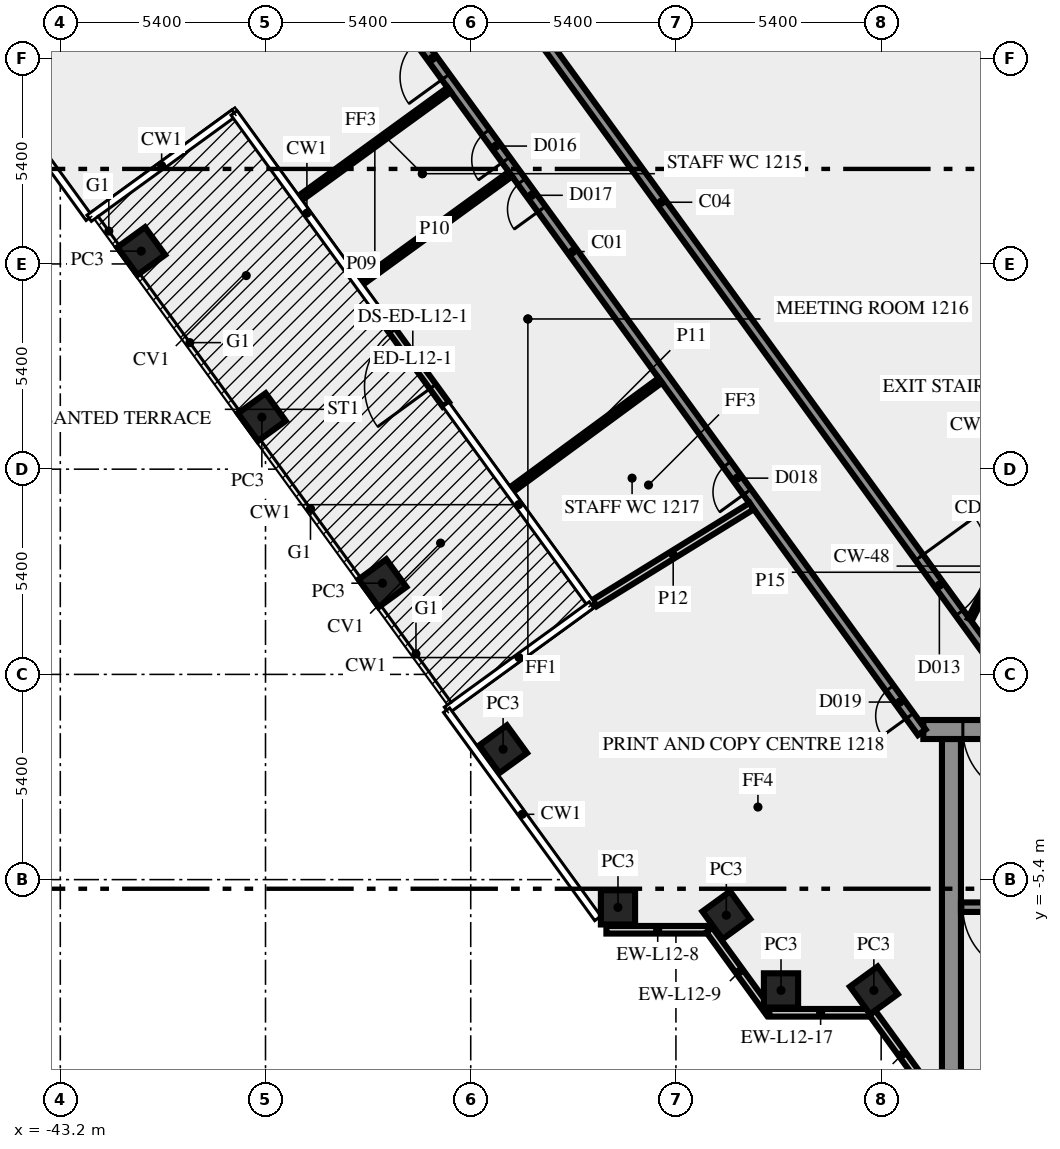
"""IFC4 building model, lengths in metres.
Left out: names, types, materials, properties, quantities, classifications, styles, units other than length and angle.
Written with IfcOpenShell. Run it as: python <this file> out.ifc"""

import sys

from ifc_helpers import new_model, si_unit, direction, frame, frame_2d, origin, origin_2d, place, context, subcontext, project, spatial, rectangle, extrude, element, fill, save


model = new_model("IFC4")
c1 = context("Model", 3, precision=1e-05, world=origin(), true_north=direction((0.0, 1.0)))
c2 = subcontext(c1, "Body", "Model", "MODEL_VIEW")
j1 = project(units=[si_unit("LENGTHUNIT", "METRE"), si_unit("PLANEANGLEUNIT", "RADIAN")], contexts=[c1])
p1 = place(None, origin())
s1 = spatial("IfcSite", under=j1, at=p1, CompositionType="ELEMENT")
p2 = place(p1, origin())
s2 = spatial("IfcBuilding", under=s1, at=p2, CompositionType="ELEMENT")
p3 = place(p2, frame((0.0, 0.0, 55.0)))
s3 = spatial("IfcBuildingStorey", under=s2, at=p3, CompositionType="ELEMENT", Elevation=55.0)
for number, where, z_axis, x_axis in (
    (1, (-41.07, 11.137, 0.0), (0.0, 0.0, 1.0), (0.588, -0.809, 0.0)),
    (2, (-37.896, 6.769, 0.0), (0.0, 0.0, 1.0), (0.588, -0.809, 0.0)),
    (3, (-34.722, 2.4, 0.0), (0.0, 0.0, 1.0), (0.588, -0.809, 0.0)),
    (4, (-31.548, -1.969, 0.0), (0.0, 0.0, 1.0), (0.588, -0.809, 0.0)),
    (5, (-28.525, -6.13, 0.0), (0.0, 0.0, 1.0), (1.0, 0.0, 0.0)),
    (6, (-25.674, -6.337, 0.0), (0.0, 0.0, 1.0), (0.588, -0.809, 0.0)),
    (7, (-24.235, -8.315, 0.0), (0.0, 0.0, 1.0), (1.0, 0.0, 0.0)),
    (8, (-21.792, -8.315, 0.0), (0.0, 0.0, 1.0), (0.588, -0.809, 0.0)),
):
    element("IfcColumn", number, at=place(p3, frame(where, z_axis=z_axis, x_axis=x_axis)), inside=s3, PredefinedType="COLUMN", context=c2, shape_type="SweptSolid", body=[
        extrude(rectangle(XDim=0.9, YDim=0.9, at=origin_2d()), origin(), (0.0, 0.0, 1.0), 3.65),
    ])
p4 = place(p3, frame((-33.053, 7.103, 0.0), z_axis=(0.0, 0.0, 1.0), x_axis=(-0.587774760134, 0.809024617271, 0.0)))
e9 = element("IfcWall", 9, at=p4, inside=s3, PredefinedType="SOLIDWALL", context=c2, shape_type="SweptSolid", body=[
    extrude(rectangle(XDim=2.963, YDim=0.2, at=frame_2d((1.481, 0.0))), origin(), (0.0, 0.0, 1.0), 3.65),
])
p5 = place(p4, frame((0.582, 0.0, 0.0)))
e10 = element("IfcOpeningElement", 10, at=p5, cuts=e9, PredefinedType="OPENING", context=c2, shape_type="SweptSolid", body=[
    extrude(rectangle(XDim=1.8, YDim=2.4, at=frame_2d((0.9, 1.2))), frame((0.0, 0.11, 0.0), z_axis=(0.0, -1.0, 0.0), x_axis=(1.0, 0.0, 0.0)), (0.0, 0.0, 1.0), 0.22),
])
p6 = place(p3, frame((-28.83, -6.719, 0.0), z_axis=(0.0, 0.0, 1.0), x_axis=(1.0, 0.0, 0.0)))
e11 = element("IfcWall", 11, at=p6, inside=s3, PredefinedType="SOLIDWALL", context=c2, shape_type="SweptSolid", body=[
    extrude(rectangle(XDim=2.7, YDim=0.2, at=frame_2d((1.35, 0.0))), origin(), (0.0, 0.0, 1.0), 3.65),
])
p7 = place(p3, frame((-26.12, -6.724, 0.0), z_axis=(0.0, 0.0, 1.0), x_axis=(0.587720002413, -0.809064397168, 0.0)))
e12 = element("IfcWall", 12, at=p7, inside=s3, PredefinedType="SOLIDWALL", context=c2, shape_type="SweptSolid", body=[
    extrude(rectangle(XDim=2.7, YDim=0.2, at=frame_2d((1.35, 0.0))), origin(), (0.0, 0.0, 1.0), 3.65),
])
p8 = place(p3, frame((-24.543, -8.904, 0.0), z_axis=(0.0, 0.0, 1.0), x_axis=(1.0, 0.0, 0.0)))
e13 = element("IfcWall", 13, at=p8, inside=s3, PredefinedType="SOLIDWALL", context=c2, shape_type="SweptSolid", body=[
    extrude(rectangle(XDim=2.7, YDim=0.2, at=frame_2d((1.35, 0.0))), origin(), (0.0, 0.0, 1.0), 3.65),
])
p9 = place(p3, frame((-21.833, -8.909, 0.0), z_axis=(0.0, 0.0, 1.0), x_axis=(0.587766567315, -0.809030569476, 0.0)))
e14 = element("IfcWall", 14, at=p9, inside=s3, PredefinedType="SOLIDWALL", context=c2, shape_type="SweptSolid", body=[
    extrude(rectangle(XDim=2.688, YDim=0.2, at=frame_2d((1.344, 0.0))), origin(), (0.0, 0.0, 1.0), 3.65),
])
p10 = place(p3, frame((-19.75, -10.5, 0.0), z_axis=(0.0, 0.0, 1.0), x_axis=(0.0, 1.0, 0.0)))
e15 = element("IfcWall", 15, at=p10, inside=s3, PredefinedType="SHEAR", context=c2, shape_type="SweptSolid", body=[
    extrude(rectangle(XDim=8.8, YDim=0.5, at=frame_2d((4.4, 0.0))), origin(), (0.0, 0.0, 1.0), 3.65),
])
p11 = place(p3, frame((-11.45, -6.125, 0.0), z_axis=(0.0, 0.0, 1.0), x_axis=(-1.0, 0.0, 0.0)))
e16 = element("IfcWall", 16, at=p11, inside=s3, PredefinedType="SHEAR", context=c2, shape_type="SweptSolid", body=[
    extrude(rectangle(XDim=8.05, YDim=0.25, at=frame_2d((4.025, 0.0))), origin(), (0.0, 0.0, 1.0), 3.65),
])
p12 = place(p11, frame((6.2, 0.0, 0.0)))
e17 = element("IfcOpeningElement", 17, at=p12, cuts=e16, PredefinedType="OPENING", context=c2, shape_type="SweptSolid", body=[
    extrude(rectangle(XDim=1.8, YDim=2.1, at=frame_2d((0.9, 1.05))), frame((0.0, 0.135, 0.0), z_axis=(0.0, -1.0, 0.0), x_axis=(1.0, 0.0, 0.0)), (0.0, 0.0, 1.0), 0.27),
])
p13 = place(p3, frame((20.49, -1.45, 0.0), z_axis=(0.0, 0.0, 1.0), x_axis=(-1.0, 0.0, 0.0)))
e18 = element("IfcWall", 18, at=p13, inside=s3, PredefinedType="SHEAR", context=c2, shape_type="SweptSolid", body=[
    extrude(rectangle(XDim=40.98, YDim=0.5, at=frame_2d((20.49, 0.0))), origin(), (0.0, 0.0, 1.0), 3.65),
])
p14 = place(p13, frame((38.14, 0.0, 0.0)))
e19 = element("IfcOpeningElement", 19, at=p14, cuts=e18, PredefinedType="OPENING", context=c2, shape_type="SweptSolid", body=[
    extrude(rectangle(XDim=1.8, YDim=2.1, at=frame_2d((0.9, 1.05))), frame((0.0, 0.26, 0.0), z_axis=(0.0, -1.0, 0.0), x_axis=(1.0, 0.0, 0.0)), (0.0, 0.0, 1.0), 0.52),
])
p15 = place(p13, frame((35.89, 0.0, 0.0)))
e20 = element("IfcOpeningElement", 20, at=p15, cuts=e18, PredefinedType="OPENING", context=c2, shape_type="SweptSolid", body=[
    extrude(rectangle(XDim=0.9, YDim=2.1, at=frame_2d((0.45, 1.05))), frame((0.0, 0.26, 0.0), z_axis=(0.0, -1.0, 0.0), x_axis=(1.0, 0.0, 0.0)), (0.0, 0.0, 1.0), 0.52),
])
p16 = place(p13, frame((32.94, 0.0, 0.0)))
e21 = element("IfcOpeningElement", 21, at=p16, cuts=e18, PredefinedType="OPENING", context=c2, shape_type="SweptSolid", body=[
    extrude(rectangle(XDim=0.9, YDim=2.1, at=frame_2d((0.45, 1.05))), frame((0.0, 0.26, 0.0), z_axis=(0.0, -1.0, 0.0), x_axis=(1.0, 0.0, 0.0)), (0.0, 0.0, 1.0), 0.52),
])
p17 = place(p13, frame((19.59, 0.0, 0.0)))
e22 = element("IfcOpeningElement", 22, at=p17, cuts=e18, PredefinedType="OPENING", context=c2, shape_type="SweptSolid", body=[
    extrude(rectangle(XDim=2.0, YDim=2.1, at=frame_2d((1.0, 1.05))), frame((0.0, 0.26, 0.0), z_axis=(0.0, -1.0, 0.0), x_axis=(1.0, 0.0, 0.0)), (0.0, 0.0, 1.0), 0.52),
])
p18 = place(p13, frame((7.14, 0.0, 0.0)))
e23 = element("IfcOpeningElement", 23, at=p18, cuts=e18, PredefinedType="OPENING", context=c2, shape_type="SweptSolid", body=[
    extrude(rectangle(XDim=0.9, YDim=2.1, at=frame_2d((0.45, 1.05))), frame((0.0, 0.26, 0.0), z_axis=(0.0, -1.0, 0.0), x_axis=(1.0, 0.0, 0.0)), (0.0, 0.0, 1.0), 0.52),
])
p19 = place(p13, frame((5.028, 0.0, 0.0)))
e24 = element("IfcOpeningElement", 24, at=p19, cuts=e18, PredefinedType="OPENING", context=c2, shape_type="SweptSolid", body=[
    extrude(rectangle(XDim=0.8, YDim=2.1, at=frame_2d((0.4, 1.05))), frame((0.0, 0.26, 0.0), z_axis=(0.0, -1.0, 0.0), x_axis=(1.0, 0.0, 0.0)), (0.0, 0.0, 1.0), 0.52),
])
p20 = place(p13, frame((3.452, 0.0, 0.0)))
e25 = element("IfcOpeningElement", 25, at=p20, cuts=e18, PredefinedType="OPENING", context=c2, shape_type="SweptSolid", body=[
    extrude(rectangle(XDim=0.8, YDim=2.1, at=frame_2d((0.4, 1.05))), frame((0.0, 0.26, 0.0), z_axis=(0.0, -1.0, 0.0), x_axis=(1.0, 0.0, 0.0)), (0.0, 0.0, 1.0), 0.52),
])
p21 = place(p13, frame((1.04, 0.0, 0.0)))
e26 = element("IfcOpeningElement", 26, at=p21, cuts=e18, PredefinedType="OPENING", context=c2, shape_type="SweptSolid", body=[
    extrude(rectangle(XDim=1.8, YDim=2.1, at=frame_2d((0.9, 1.05))), frame((0.0, 0.26, 0.0), z_axis=(0.0, -1.0, 0.0), x_axis=(1.0, 0.0, 0.0)), (0.0, 0.0, 1.0), 0.52),
])
p22 = place(p3, frame((-20.531, -1.523, 0.0), z_axis=(0.0, 0.0, 1.0), x_axis=(-0.587784593204, 0.809017473231, 0.0)))
e27 = element("IfcWall", 27, at=p22, inside=s3, PredefinedType="SOLIDWALL", context=c2, shape_type="SweptSolid", body=[
    extrude(rectangle(XDim=44.67, YDim=0.25, at=frame_2d((22.335, 0.0))), origin(), (0.0, 0.0, 1.0), 3.65),
])
p23 = place(p22, frame((21.316, 0.0, 0.0)))
e28 = element("IfcOpeningElement", 28, at=p23, cuts=e27, PredefinedType="OPENING", context=c2, shape_type="SweptSolid", body=[
    extrude(rectangle(XDim=1.2, YDim=2.1, at=frame_2d((0.6, 1.05))), frame((0.0, 0.135, 0.0), z_axis=(0.0, -1.0, 0.0), x_axis=(1.0, 0.0, 0.0)), (0.0, 0.0, 1.0), 0.27),
])
p24 = place(p22, frame((17.015, 0.0, 0.0)))
e29 = element("IfcOpeningElement", 29, at=p24, cuts=e27, PredefinedType="OPENING", context=c2, shape_type="SweptSolid", body=[
    extrude(rectangle(XDim=0.9, YDim=2.1, at=frame_2d((0.45, 1.05))), frame((0.0, 0.135, 0.0), z_axis=(0.0, -1.0, 0.0), x_axis=(1.0, 0.0, 0.0)), (0.0, 0.0, 1.0), 0.27),
])
p25 = place(p22, frame((0.533, 0.0, 0.0)))
e30 = element("IfcOpeningElement", 30, at=p25, cuts=e27, PredefinedType="OPENING", context=c2, shape_type="SweptSolid", body=[
    extrude(rectangle(XDim=0.9, YDim=2.1, at=frame_2d((0.45, 1.05))), frame((0.0, 0.135, 0.0), z_axis=(0.0, -1.0, 0.0), x_axis=(1.0, 0.0, 0.0)), (0.0, 0.0, 1.0), 0.27),
])
p26 = place(p22, frame((18.616, 0.0, 0.0)))
e31 = element("IfcOpeningElement", 31, at=p26, cuts=e27, PredefinedType="OPENING", context=c2, shape_type="SweptSolid", body=[
    extrude(rectangle(XDim=0.9, YDim=2.1, at=frame_2d((0.45, 1.05))), frame((0.0, 0.135, 0.0), z_axis=(0.0, -1.0, 0.0), x_axis=(1.0, 0.0, 0.0)), (0.0, 0.0, 1.0), 0.27),
])
p27 = place(p22, frame((7.816, 0.0, 0.0)))
e32 = element("IfcOpeningElement", 32, at=p27, cuts=e27, PredefinedType="OPENING", context=c2, shape_type="SweptSolid", body=[
    extrude(rectangle(XDim=0.9, YDim=2.1, at=frame_2d((0.45, 1.05))), frame((0.0, 0.135, 0.0), z_axis=(0.0, -1.0, 0.0), x_axis=(1.0, 0.0, 0.0)), (0.0, 0.0, 1.0), 0.27),
])
p28 = place(p3, frame((-37.232, 25.972, 0.0), z_axis=(0.0, 0.0, 1.0), x_axis=(0.587786323093, -0.809016216391, 0.0)))
e33 = element("IfcWall", 33, at=p28, inside=s3, PredefinedType="SOLIDWALL", context=c2, shape_type="SweptSolid", body=[
    extrude(rectangle(XDim=33.493, YDim=0.25, at=frame_2d((16.747, 0.0))), origin(), (0.0, 0.0, 1.0), 3.65),
])
p29 = place(p28, frame((28.301, 0.0, 0.0)))
e34 = element("IfcOpeningElement", 34, at=p29, cuts=e33, PredefinedType="OPENING", context=c2, shape_type="SweptSolid", body=[
    extrude(rectangle(XDim=1.8, YDim=2.1, at=frame_2d((0.9, 1.05))), frame((0.0, 0.135, 0.0), z_axis=(0.0, -1.0, 0.0), x_axis=(1.0, 0.0, 0.0)), (0.0, 0.0, 1.0), 0.27),
])
p30 = place(p28, frame((4.235, 0.0, 0.0)))
e35 = element("IfcOpeningElement", 35, at=p30, cuts=e33, PredefinedType="OPENING", context=c2, shape_type="SweptSolid", body=[
    extrude(rectangle(XDim=1.8, YDim=2.1, at=frame_2d((0.9, 1.05))), frame((0.0, 0.135, 0.0), z_axis=(0.0, -1.0, 0.0), x_axis=(1.0, 0.0, 0.0)), (0.0, 0.0, 1.0), 0.27),
])
p31 = place(p28, frame((2.685, 0.0, 0.0)))
e36 = element("IfcOpeningElement", 36, at=p31, cuts=e33, PredefinedType="OPENING", context=c2, shape_type="SweptSolid", body=[
    extrude(rectangle(XDim=0.9, YDim=2.1, at=frame_2d((0.45, 1.05))), frame((0.0, 0.135, 0.0), z_axis=(0.0, -1.0, 0.0), x_axis=(1.0, 0.0, 0.0)), (0.0, 0.0, 1.0), 0.27),
])
p32 = place(p3, frame((-36.88, 12.539, 0.0), z_axis=(0.0, 0.0, 1.0), x_axis=(0.809072133835, 0.58770935185, 0.0)))
e37 = element("IfcWall", 37, at=p32, inside=s3, PredefinedType="PARTITIONING", context=c2, shape_type="SweptSolid", body=[
    extrude(rectangle(XDim=4.836, YDim=0.15, at=frame_2d((2.418, 0.0))), origin(), (0.0, 0.0, 1.0), 3.65),
])
p33 = place(p3, frame((-31.356, 13.164, 0.0), z_axis=(0.0, 0.0, 1.0), x_axis=(-0.809191339455, -0.587545212006, 0.0)))
e38 = element("IfcWall", 38, at=p33, inside=s3, PredefinedType="PARTITIONING", context=c2, shape_type="SweptSolid", body=[
    extrude(rectangle(XDim=4.937, YDim=0.15, at=frame_2d((2.468, 0.0))), origin(), (0.0, 0.0, 1.0), 3.65),
])
p34 = place(p3, frame((-31.391, 4.813, 0.0), z_axis=(0.0, 0.0, 1.0), x_axis=(0.805925155422, 0.592017435434, 0.0)))
e39 = element("IfcWall", 39, at=p34, inside=s3, PredefinedType="PARTITIONING", context=c2, shape_type="SweptSolid", body=[
    extrude(rectangle(XDim=4.936, YDim=0.15, at=frame_2d((2.468, 0.0))), origin(), (0.0, 0.0, 1.0), 3.65),
])
p35 = place(p3, frame((-25.008, 4.427, 0.0), z_axis=(0.0, 0.0, 1.0), x_axis=(-0.850959437964, -0.525231410847, 0.0)))
e40 = element("IfcWall", 40, at=p35, inside=s3, PredefinedType="SOLIDWALL", context=c2, shape_type="SweptSolid", body=[
    extrude(rectangle(XDim=4.851, YDim=0.2, at=frame_2d((2.425, 0.0))), origin(), (0.0, 0.0, 1.0), 3.65),
])
p36 = place(p3, frame((-19.261, 1.45, 0.0), z_axis=(0.0, 0.0, 1.0), x_axis=(0.453950796792, 0.891026752736, 0.0)))
e41 = element("IfcWall", 41, at=p36, inside=s3, PredefinedType="PARTITIONING", context=c2, shape_type="SweptSolid", body=[
    extrude(rectangle(XDim=2.778, YDim=0.12, at=frame_2d((1.389, 0.0))), origin(), (0.0, 0.0, 1.0), 3.65),
])
p37 = place(p5, origin())
e42 = element("IfcDoor", 42, at=p37, inside=s3, OperationType="DOUBLE_DOOR_SINGLE_SWING", PredefinedType="DOOR", context=c2, shape_type="SweptSolid", body=[
    extrude(rectangle(XDim=1.8, YDim=2.4, at=frame_2d((0.9, 1.2))), frame((0.0, 0.025, 0.0), z_axis=(0.0, -1.0, 0.0), x_axis=(1.0, 0.0, 0.0)), (0.0, 0.0, 1.0), 0.05),
])
fill(e10, e42)
p38 = place(p12, origin())
e43 = element("IfcDoor", 43, at=p38, inside=s3, OperationType="DOUBLE_DOOR_SINGLE_SWING", PredefinedType="DOOR", context=c2, shape_type="SweptSolid", body=[
    extrude(rectangle(XDim=1.8, YDim=2.1, at=frame_2d((0.9, 1.05))), frame((0.0, 0.025, 0.0), z_axis=(0.0, -1.0, 0.0), x_axis=(1.0, 0.0, 0.0)), (0.0, 0.0, 1.0), 0.05),
])
fill(e17, e43)
p39 = place(p14, origin())
e44 = element("IfcDoor", 44, at=p39, inside=s3, OperationType="DOUBLE_DOOR_SINGLE_SWING", PredefinedType="DOOR", context=c2, shape_type="SweptSolid", body=[
    extrude(rectangle(XDim=1.8, YDim=2.1, at=frame_2d((0.9, 1.05))), frame((0.0, 0.025, 0.0), z_axis=(0.0, -1.0, 0.0), x_axis=(1.0, 0.0, 0.0)), (0.0, 0.0, 1.0), 0.05),
])
fill(e19, e44)
p40 = place(p29, origin())
e45 = element("IfcDoor", 45, at=p40, inside=s3, OperationType="DOUBLE_DOOR_SINGLE_SWING", PredefinedType="DOOR", context=c2, shape_type="SweptSolid", body=[
    extrude(rectangle(XDim=1.8, YDim=2.1, at=frame_2d((0.9, 1.05))), frame((0.0, 0.025, 0.0), z_axis=(0.0, -1.0, 0.0), x_axis=(1.0, 0.0, 0.0)), (0.0, 0.0, 1.0), 0.05),
])
fill(e34, e45)
p41 = place(p23, origin())
e46 = element("IfcDoor", 46, at=p41, inside=s3, OperationType="SINGLE_SWING_LEFT", PredefinedType="DOOR", context=c2, shape_type="SweptSolid", body=[
    extrude(rectangle(XDim=1.2, YDim=2.1, at=frame_2d((0.6, 1.05))), frame((0.0, 0.025, 0.0), z_axis=(0.0, -1.0, 0.0), x_axis=(1.0, 0.0, 0.0)), (0.0, 0.0, 1.0), 0.05),
])
fill(e28, e46)
p42 = place(p24, origin())
e47 = element("IfcDoor", 47, at=p42, inside=s3, OperationType="SINGLE_SWING_RIGHT", PredefinedType="DOOR", context=c2, shape_type="SweptSolid", body=[
    extrude(rectangle(XDim=0.9, YDim=2.1, at=frame_2d((0.45, 1.05))), frame((0.0, 0.025, 0.0), z_axis=(0.0, -1.0, 0.0), x_axis=(1.0, 0.0, 0.0)), (0.0, 0.0, 1.0), 0.05),
])
fill(e29, e47)
p43 = place(p25, origin())
e48 = element("IfcDoor", 48, at=p43, inside=s3, OperationType="SINGLE_SWING_LEFT", PredefinedType="DOOR", context=c2, shape_type="SweptSolid", body=[
    extrude(rectangle(XDim=0.9, YDim=2.1, at=frame_2d((0.45, 1.05))), frame((0.0, 0.025, 0.0), z_axis=(0.0, -1.0, 0.0), x_axis=(1.0, 0.0, 0.0)), (0.0, 0.0, 1.0), 0.05),
])
fill(e30, e48)
p44 = place(p26, origin())
e49 = element("IfcDoor", 49, at=p44, inside=s3, OperationType="SINGLE_SWING_LEFT", PredefinedType="DOOR", context=c2, shape_type="SweptSolid", body=[
    extrude(rectangle(XDim=0.9, YDim=2.1, at=frame_2d((0.45, 1.05))), frame((0.0, 0.025, 0.0), z_axis=(0.0, -1.0, 0.0), x_axis=(1.0, 0.0, 0.0)), (0.0, 0.0, 1.0), 0.05),
])
fill(e31, e49)
p45 = place(p27, origin())
e50 = element("IfcDoor", 50, at=p45, inside=s3, OperationType="SINGLE_SWING_LEFT", PredefinedType="DOOR", context=c2, shape_type="SweptSolid", body=[
    extrude(rectangle(XDim=0.9, YDim=2.1, at=frame_2d((0.45, 1.05))), frame((0.0, 0.025, 0.0), z_axis=(0.0, -1.0, 0.0), x_axis=(1.0, 0.0, 0.0)), (0.0, 0.0, 1.0), 0.05),
])
fill(e32, e50)
save(model, sys.argv[1])
